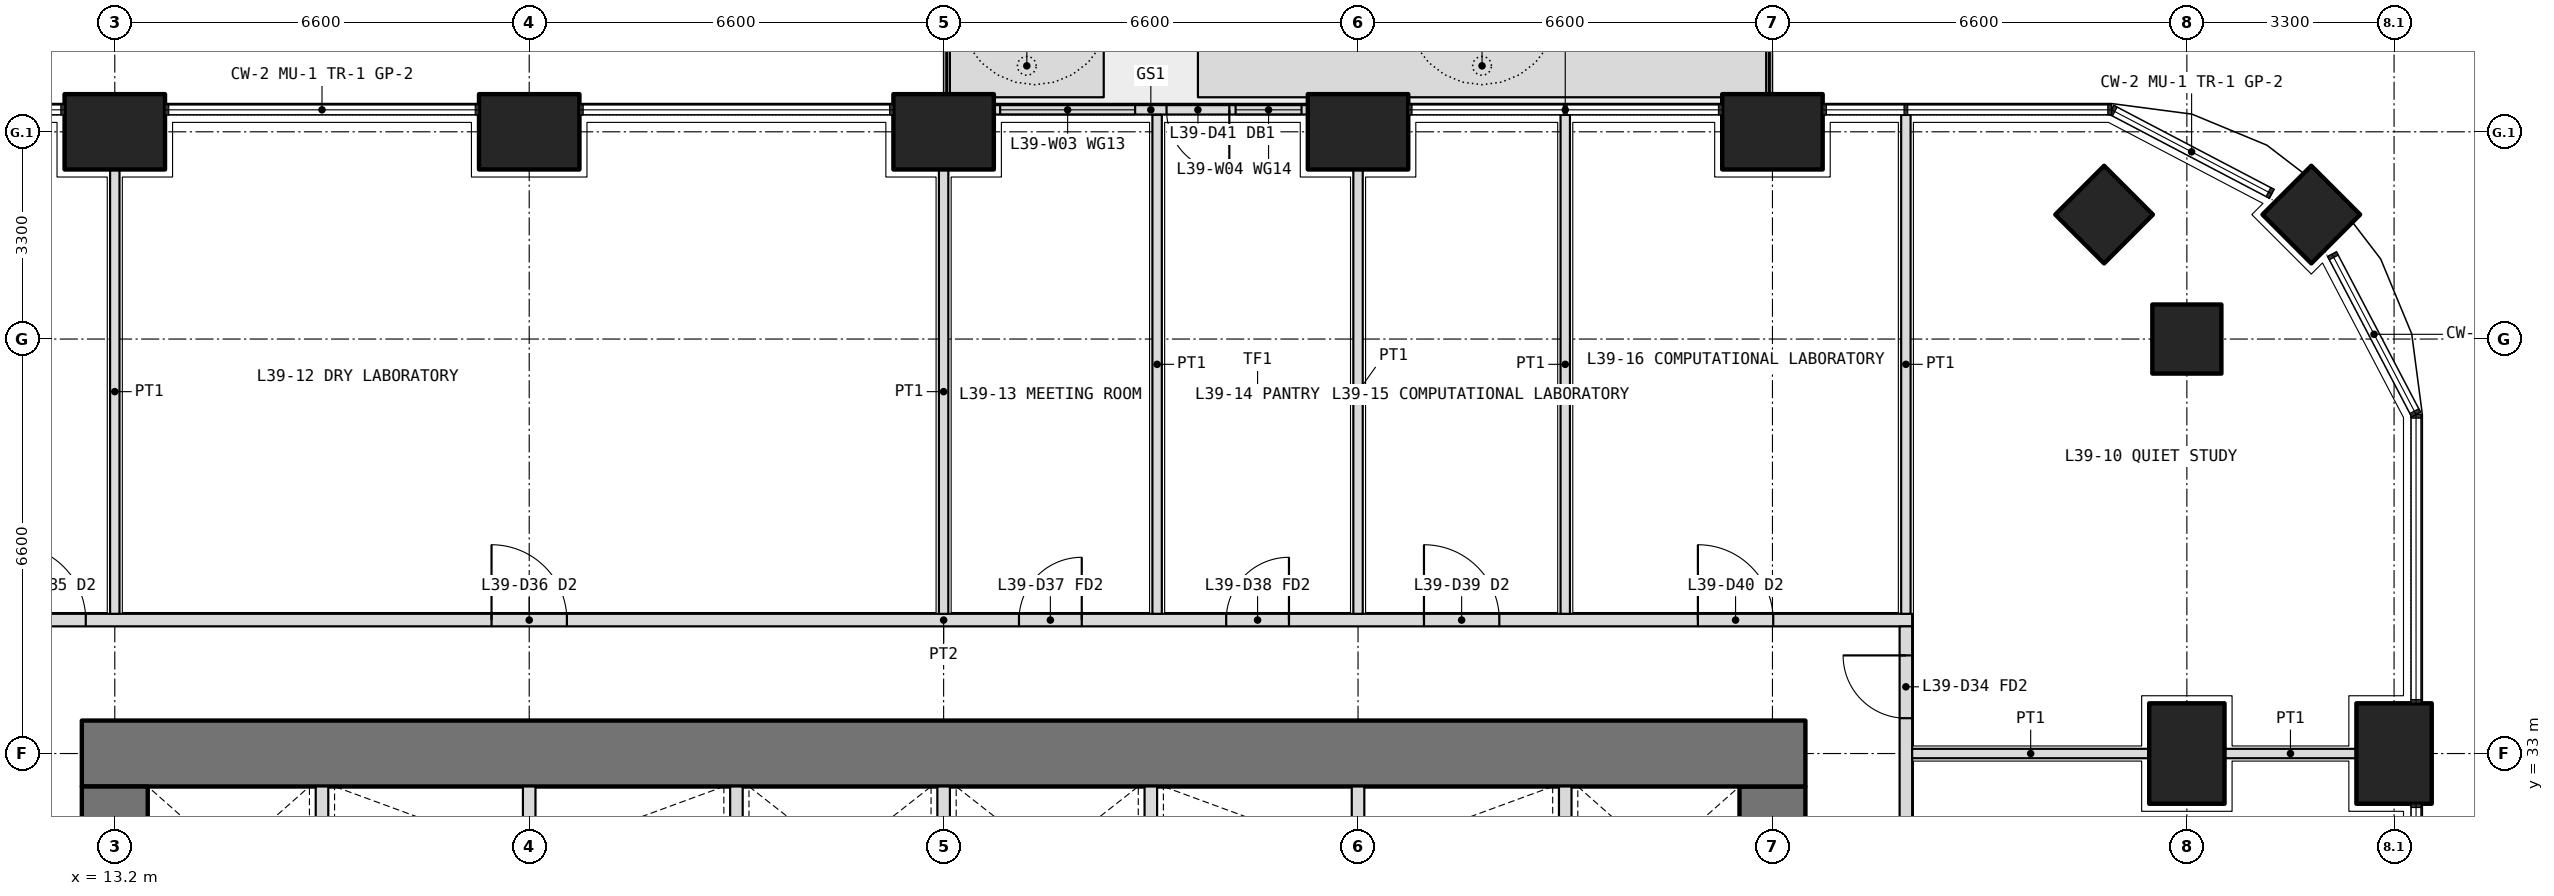
"""IFC4 building model, lengths in metres.
Left out: names, types, materials, properties, quantities, classifications, styles, units other than length and angle.
Written with IfcOpenShell. Run it as: python <this file> out.ifc"""

import sys

from ifc_helpers import new_model, si_unit, direction, frame, frame_2d, origin, origin_2d, place, context, subcontext, project, spatial, polyline, rectangle, outline, extrude, element, fill, save


model = new_model("IFC4")
c1 = context("Model", 3, precision=1e-05, world=origin(), true_north=direction((0.0, 1.0)))
c2 = subcontext(c1, "Body", "Model", "MODEL_VIEW")
j1 = project(units=[si_unit("LENGTHUNIT", "METRE"), si_unit("PLANEANGLEUNIT", "RADIAN")], contexts=[c1])
p1 = place(None, origin())
s1 = spatial("IfcSite", under=j1, at=p1, CompositionType="ELEMENT")
p2 = place(p1, origin())
s2 = spatial("IfcBuilding", under=s1, at=p2, CompositionType="ELEMENT")
p3 = place(p2, frame((0.0, 0.0, 172.5)))
s3 = spatial("IfcBuildingStorey", under=s2, at=p3, CompositionType="ELEMENT", Elevation=172.5)
p4 = place(p3, frame((48.182, 41.582, 0.0), z_axis=(0.0, 0.0, 1.0), x_axis=(0.707106781187, 0.707106781187, 0.0)))
e1 = element("IfcColumn", 1, at=p4, inside=s3, PredefinedType="COLUMN", context=c2, shape_type="SweptSolid", body=[
    extrude(rectangle(XDim=1.1, YDim=1.1, at=origin_2d()), origin(), (0.0, 0.0, 1.0), 4.2),
])
for number, where, z_axis, x_axis in (
    (2, (49.5, 33.0, 0.0), (0.0, 0.0, 1.0), (0.0, 1.0, 0.0)),
    (3, (13.2, 42.9, 0.0), (0.0, 0.0, 1.0), (1.0, 0.0, 0.0)),
    (4, (19.8, 42.9, 0.0), (0.0, 0.0, 1.0), (1.0, 0.0, 0.0)),
    (5, (26.4, 42.9, 0.0), (0.0, 0.0, 1.0), (1.0, 0.0, 0.0)),
    (6, (33.0, 42.9, 0.0), (0.0, 0.0, 1.0), (1.0, 0.0, 0.0)),
    (7, (39.6, 42.9, 0.0), (0.0, 0.0, 1.0), (1.0, 0.0, 0.0)),
):
    element("IfcColumn", number, at=place(p3, frame(where, z_axis=z_axis, x_axis=x_axis)), inside=s3, PredefinedType="COLUMN", context=c2, shape_type="SweptSolid", body=[
        extrude(rectangle(XDim=1.6, YDim=1.2, at=origin_2d()), origin(), (0.0, 0.0, 1.0), 4.2),
    ])
for number, where, z_axis, x_axis in (
    (8, (46.2, 39.6, 0.0), (0.0, 0.0, 1.0), (1.0, 0.0, 0.0)),
    (9, (44.882, 41.582, 0.0), (0.0, 0.0, 1.0), (0.707, 0.707, 0.0)),
):
    element("IfcColumn", number, at=place(p3, frame(where, z_axis=z_axis, x_axis=x_axis)), inside=s3, PredefinedType="COLUMN", context=c2, shape_type="SweptSolid", body=[
        extrude(rectangle(XDim=1.1, YDim=1.1, at=origin_2d()), origin(), (0.0, 0.0, 1.0), 4.2),
    ])
p5 = place(p3, frame((46.2, 33.0, 0.0), z_axis=(0.0, 0.0, 1.0), x_axis=(0.0, 1.0, 0.0)))
e10 = element("IfcColumn", 10, at=p5, inside=s3, PredefinedType="COLUMN", context=c2, shape_type="SweptSolid", body=[
    extrude(rectangle(XDim=1.6, YDim=1.2, at=origin_2d()), origin(), (0.0, 0.0, 1.0), 4.2),
])
p6 = place(p3, origin())
e11 = element("IfcWall", 11, at=p6, inside=s3, PredefinedType="USERDEFINED", context=c2, shape_type="SweptSolid", body=[
    extrude(outline(polyline([(26.5, 43.45), (28.95, 43.45), (28.95, 44.45), (26.5, 44.45), (26.5, 43.45)]), holes=[polyline([(26.65, 43.6), (28.8, 43.6), (28.8, 44.3), (26.65, 44.3), (26.65, 43.6)])]), origin(), (0.0, 0.0, 1.0), 1.05),
])
p7 = place(p3, origin())
e12 = element("IfcWall", 12, at=p7, inside=s3, PredefinedType="USERDEFINED", context=c2, shape_type="SweptSolid", body=[
    extrude(outline(polyline([(30.45, 43.45), (39.5, 43.45), (39.5, 44.45), (30.45, 44.45), (30.45, 43.45)]), holes=[polyline([(30.6, 43.6), (39.35, 43.6), (39.35, 44.3), (30.6, 44.3), (30.6, 43.6)])]), origin(), (0.0, 0.0, 1.0), 1.05),
])
p8 = place(p3, frame((32.2, 43.25, 0.0), z_axis=(0.0, 0.0, 1.0), x_axis=(-1.0, 0.0, 0.0)))
e13 = element("IfcWall", 13, at=p8, inside=s3, PredefinedType="SOLIDWALL", context=c2, shape_type="SweptSolid", body=[
    extrude(rectangle(XDim=5.0, YDim=0.15, at=frame_2d((2.5, 0.0))), origin(), (0.0, 0.0, 1.0), 2.7),
])
p9 = place(p8, frame((1.25, 0.0, 0.0)))
e14 = element("IfcOpeningElement", 14, at=p9, cuts=e13, PredefinedType="OPENING", context=c2, shape_type="SweptSolid", body=[
    extrude(rectangle(XDim=1.0, YDim=2.4, at=frame_2d((0.5, 1.2))), frame((0.0, 0.085, 0.0), z_axis=(0.0, -1.0, 0.0), x_axis=(1.0, 0.0, 0.0)), (0.0, 0.0, 1.0), 0.17),
])
p10 = place(p8, frame((0.1, 0.0, 0.1)))
e15 = element("IfcOpeningElement", 15, at=p10, cuts=e13, PredefinedType="OPENING", context=c2, shape_type="SweptSolid", body=[
    extrude(rectangle(XDim=1.05, YDim=2.3, at=frame_2d((0.525, 1.15))), frame((0.0, 0.085, 0.0), z_axis=(0.0, -1.0, 0.0), x_axis=(1.0, 0.0, 0.0)), (0.0, 0.0, 1.0), 0.17),
])
p11 = place(p8, frame((2.75, 0.0, 0.1)))
e16 = element("IfcOpeningElement", 16, at=p11, cuts=e13, PredefinedType="OPENING", context=c2, shape_type="SweptSolid", body=[
    extrude(rectangle(XDim=2.15, YDim=2.3, at=frame_2d((1.075, 1.15))), frame((0.0, 0.085, 0.0), z_axis=(0.0, -1.0, 0.0), x_axis=(1.0, 0.0, 0.0)), (0.0, 0.0, 1.0), 0.17),
])
p12 = place(p3, frame((39.6, 13.725, 0.0), z_axis=(0.0, 0.0, 1.0), x_axis=(0.0, 1.0, 0.0)))
e17 = element("IfcWall", 17, at=p12, inside=s3, PredefinedType="SHEAR", context=c2, shape_type="SweptSolid", body=[
    extrude(rectangle(XDim=18.75, YDim=1.05, at=frame_2d((9.375, 0.0))), origin(), (0.0, 0.0, 1.0), 4.2),
])
p13 = place(p12, frame((3.025, 0.0, 0.0)))
e18 = element("IfcOpeningElement", 18, at=p13, cuts=e17, PredefinedType="OPENING", context=c2, shape_type="SweptSolid", body=[
    extrude(rectangle(XDim=1.6, YDim=2.1, at=frame_2d((0.8, 1.05))), frame((0.0, 0.535, 0.0), z_axis=(0.0, -1.0, 0.0), x_axis=(1.0, 0.0, 0.0)), (0.0, 0.0, 1.0), 1.07),
])
p14 = place(p12, frame((13.825, 0.0, 0.0)))
e19 = element("IfcOpeningElement", 19, at=p14, cuts=e17, PredefinedType="OPENING", context=c2, shape_type="SweptSolid", body=[
    extrude(rectangle(XDim=1.6, YDim=2.1, at=frame_2d((0.8, 1.05))), frame((0.0, 0.535, 0.0), z_axis=(0.0, -1.0, 0.0), x_axis=(1.0, 0.0, 0.0)), (0.0, 0.0, 1.0), 1.07),
])
p15 = place(p3, frame((40.125, 33.0, 0.0), z_axis=(0.0, 0.0, 1.0), x_axis=(-1.0, 0.0, 0.0)))
e20 = element("IfcWall", 20, at=p15, inside=s3, PredefinedType="SHEAR", context=c2, shape_type="SweptSolid", body=[
    extrude(rectangle(XDim=27.45, YDim=1.05, at=frame_2d((13.725, 0.0))), origin(), (0.0, 0.0, 1.0), 4.2),
])
p16 = place(p3, frame((13.2, 32.475, 0.0), z_axis=(0.0, 0.0, 1.0), x_axis=(0.0, -1.0, 0.0)))
e21 = element("IfcWall", 21, at=p16, inside=s3, PredefinedType="SHEAR", context=c2, shape_type="SweptSolid", body=[
    extrude(rectangle(XDim=18.75, YDim=1.05, at=frame_2d((9.375, 0.0))), origin(), (0.0, 0.0, 1.0), 4.2),
])
p17 = place(p16, frame((14.125, 0.0, 0.0)))
e22 = element("IfcOpeningElement", 22, at=p17, cuts=e21, PredefinedType="OPENING", context=c2, shape_type="SweptSolid", body=[
    extrude(rectangle(XDim=1.6, YDim=2.1, at=frame_2d((0.8, 1.05))), frame((0.0, 0.535, 0.0), z_axis=(0.0, -1.0, 0.0), x_axis=(1.0, 0.0, 0.0)), (0.0, 0.0, 1.0), 1.07),
])
p18 = place(p16, frame((3.325, 0.0, 0.0)))
e23 = element("IfcOpeningElement", 23, at=p18, cuts=e21, PredefinedType="OPENING", context=c2, shape_type="SweptSolid", body=[
    extrude(rectangle(XDim=1.6, YDim=2.1, at=frame_2d((0.8, 1.05))), frame((0.0, 0.535, 0.0), z_axis=(0.0, -1.0, 0.0), x_axis=(1.0, 0.0, 0.0)), (0.0, 0.0, 1.0), 1.07),
])
for number, where, z_axis, x_axis in (
    (24, (16.5, 30.2, 0.0), (0.0, 0.0, 1.0), (0.0, 1.0, 0.0)),
    (25, (19.8, 30.2, 0.0), (0.0, 0.0, 1.0), (0.0, 1.0, 0.0)),
    (26, (23.1, 30.2, 0.0), (0.0, 0.0, 1.0), (0.0, 1.0, 0.0)),
    (27, (26.4, 30.2, 0.0), (0.0, 0.0, 1.0), (0.0, 1.0, 0.0)),
    (28, (29.7, 30.2, 0.0), (0.0, 0.0, 1.0), (0.0, 1.0, 0.0)),
    (29, (33.0, 30.2, 0.0), (0.0, 0.0, 1.0), (0.0, 1.0, 0.0)),
    (30, (36.3, 30.2, 0.0), (0.0, 0.0, 1.0), (0.0, 1.0, 0.0)),
):
    element("IfcWall", number, at=place(p3, frame(where, z_axis=z_axis, x_axis=x_axis)), inside=s3, PredefinedType="PARTITIONING", context=c2, shape_type="SweptSolid", body=[
        extrude(rectangle(XDim=2.275, YDim=0.2, at=frame_2d((1.138, 0.0))), origin(), (0.0, 0.0, 1.0), 4.2),
    ])
p19 = place(p3, frame((10.975, 35.125, 0.0), z_axis=(0.0, 0.0, 1.0), x_axis=(1.0, 0.0, 0.0)))
e31 = element("IfcWall", 31, at=p19, inside=s3, PredefinedType="PARTITIONING", context=c2, shape_type="SweptSolid", body=[
    extrude(rectangle(XDim=30.85, YDim=0.2, at=frame_2d((15.425, 0.0))), origin(), (0.0, 0.0, 1.0), 2.85),
])
p20 = place(p19, frame((0.562, 0.0, 0.0)))
e32 = element("IfcOpeningElement", 32, at=p20, cuts=e31, PredefinedType="OPENING", context=c2, shape_type="SweptSolid", body=[
    extrude(rectangle(XDim=1.2, YDim=2.1, at=frame_2d((0.6, 1.05))), frame((0.0, 0.11, 0.0), z_axis=(0.0, -1.0, 0.0), x_axis=(1.0, 0.0, 0.0)), (0.0, 0.0, 1.0), 0.22),
])
p21 = place(p19, frame((8.225, 0.0, 0.0)))
e33 = element("IfcOpeningElement", 33, at=p21, cuts=e31, PredefinedType="OPENING", context=c2, shape_type="SweptSolid", body=[
    extrude(rectangle(XDim=1.2, YDim=2.1, at=frame_2d((0.6, 1.05))), frame((0.0, 0.11, 0.0), z_axis=(0.0, -1.0, 0.0), x_axis=(1.0, 0.0, 0.0)), (0.0, 0.0, 1.0), 0.22),
])
p22 = place(p19, frame((16.625, 0.0, 0.0)))
e34 = element("IfcOpeningElement", 34, at=p22, cuts=e31, PredefinedType="OPENING", context=c2, shape_type="SweptSolid", body=[
    extrude(rectangle(XDim=1.0, YDim=2.1, at=frame_2d((0.5, 1.05))), frame((0.0, 0.11, 0.0), z_axis=(0.0, -1.0, 0.0), x_axis=(1.0, 0.0, 0.0)), (0.0, 0.0, 1.0), 0.22),
])
p23 = place(p19, frame((19.925, 0.0, 0.0)))
e35 = element("IfcOpeningElement", 35, at=p23, cuts=e31, PredefinedType="OPENING", context=c2, shape_type="SweptSolid", body=[
    extrude(rectangle(XDim=1.0, YDim=2.1, at=frame_2d((0.5, 1.05))), frame((0.0, 0.11, 0.0), z_axis=(0.0, -1.0, 0.0), x_axis=(1.0, 0.0, 0.0)), (0.0, 0.0, 1.0), 0.22),
])
p24 = place(p19, frame((23.075, 0.0, 0.0)))
e36 = element("IfcOpeningElement", 36, at=p24, cuts=e31, PredefinedType="OPENING", context=c2, shape_type="SweptSolid", body=[
    extrude(rectangle(XDim=1.2, YDim=2.1, at=frame_2d((0.6, 1.05))), frame((0.0, 0.11, 0.0), z_axis=(0.0, -1.0, 0.0), x_axis=(1.0, 0.0, 0.0)), (0.0, 0.0, 1.0), 0.22),
])
p25 = place(p19, frame((27.438, 0.0, 0.0)))
e37 = element("IfcOpeningElement", 37, at=p25, cuts=e31, PredefinedType="OPENING", context=c2, shape_type="SweptSolid", body=[
    extrude(rectangle(XDim=1.2, YDim=2.1, at=frame_2d((0.6, 1.05))), frame((0.0, 0.11, 0.0), z_axis=(0.0, -1.0, 0.0), x_axis=(1.0, 0.0, 0.0)), (0.0, 0.0, 1.0), 0.22),
])
p26 = place(p3, frame((41.725, 11.175, 0.0), z_axis=(0.0, 0.0, 1.0), x_axis=(0.0, 1.0, 0.0)))
e38 = element("IfcWall", 38, at=p26, inside=s3, PredefinedType="PARTITIONING", context=c2, shape_type="SweptSolid", body=[
    extrude(rectangle(XDim=23.85, YDim=0.2, at=frame_2d((11.925, 0.0))), origin(), (0.0, 0.0, 1.0), 2.85),
])
p27 = place(p26, frame((3.762, 0.0, 0.0)))
e39 = element("IfcOpeningElement", 39, at=p27, cuts=e38, PredefinedType="OPENING", context=c2, shape_type="SweptSolid", body=[
    extrude(rectangle(XDim=1.0, YDim=2.1, at=frame_2d((0.5, 1.05))), frame((0.0, 0.11, 0.0), z_axis=(0.0, -1.0, 0.0), x_axis=(1.0, 0.0, 0.0)), (0.0, 0.0, 1.0), 0.22),
])
p28 = place(p26, frame((9.625, 0.0, 0.0)))
e40 = element("IfcOpeningElement", 40, at=p28, cuts=e38, PredefinedType="OPENING", context=c2, shape_type="SweptSolid", body=[
    extrude(rectangle(XDim=1.0, YDim=2.1, at=frame_2d((0.5, 1.05))), frame((0.0, 0.11, 0.0), z_axis=(0.0, -1.0, 0.0), x_axis=(1.0, 0.0, 0.0)), (0.0, 0.0, 1.0), 0.22),
])
p29 = place(p26, frame((12.975, 0.0, 0.0)))
e41 = element("IfcOpeningElement", 41, at=p29, cuts=e38, PredefinedType="OPENING", context=c2, shape_type="SweptSolid", body=[
    extrude(rectangle(XDim=0.9, YDim=2.1, at=frame_2d((0.45, 1.05))), frame((0.0, 0.11, 0.0), z_axis=(0.0, -1.0, 0.0), x_axis=(1.0, 0.0, 0.0)), (0.0, 0.0, 1.0), 0.22),
])
p30 = place(p26, frame((17.925, 0.0, 0.0)))
e42 = element("IfcOpeningElement", 42, at=p30, cuts=e38, PredefinedType="OPENING", context=c2, shape_type="SweptSolid", body=[
    extrude(rectangle(XDim=1.2, YDim=2.1, at=frame_2d((0.6, 1.05))), frame((0.0, 0.11, 0.0), z_axis=(0.0, -1.0, 0.0), x_axis=(1.0, 0.0, 0.0)), (0.0, 0.0, 1.0), 0.22),
])
p31 = place(p26, frame((22.387, 0.0, 0.0)))
e43 = element("IfcOpeningElement", 43, at=p31, cuts=e38, PredefinedType="OPENING", context=c2, shape_type="SweptSolid", body=[
    extrude(rectangle(XDim=1.0, YDim=2.1, at=frame_2d((0.5, 1.05))), frame((0.0, 0.11, 0.0), z_axis=(0.0, -1.0, 0.0), x_axis=(1.0, 0.0, 0.0)), (0.0, 0.0, 1.0), 0.22),
])
p32 = place(p3, frame((41.725, 43.17, 0.0), z_axis=(0.0, 0.0, 1.0), x_axis=(0.0, -1.0, 0.0)))
e44 = element("IfcWall", 44, at=p32, inside=s3, PredefinedType="PARTITIONING", context=c2, shape_type="SweptSolid", body=[
    extrude(rectangle(XDim=7.945, YDim=0.15, at=frame_2d((3.972, 0.0))), origin(), (0.0, 0.0, 1.0), 2.7),
])
p33 = place(p3, frame((48.9, 33.0, 0.0), z_axis=(0.0, 0.0, 1.0), x_axis=(-1.0, 0.0, 0.0)))
e45 = element("IfcWall", 45, at=p33, inside=s3, PredefinedType="PARTITIONING", context=c2, shape_type="SweptSolid", body=[
    extrude(rectangle(XDim=2.1, YDim=0.15, at=frame_2d((1.05, 0.0))), origin(), (0.0, 0.0, 1.0), 2.85),
])
p34 = place(p3, frame((45.6, 33.0, 0.0), z_axis=(0.0, 0.0, 1.0), x_axis=(-1.0, 0.0, 0.0)))
e46 = element("IfcWall", 46, at=p34, inside=s3, PredefinedType="PARTITIONING", context=c2, shape_type="SweptSolid", body=[
    extrude(rectangle(XDim=3.775, YDim=0.15, at=frame_2d((1.888, 0.0))), origin(), (0.0, 0.0, 1.0), 2.85),
])
p35 = place(p3, frame((29.8, 43.17, 0.0), z_axis=(0.0, 0.0, 1.0), x_axis=(0.0, -1.0, 0.0)))
e47 = element("IfcWall", 47, at=p35, inside=s3, PredefinedType="PARTITIONING", context=c2, shape_type="SweptSolid", body=[
    extrude(rectangle(XDim=7.945, YDim=0.15, at=frame_2d((3.972, 0.0))), origin(), (0.0, 0.0, 1.0), 2.7),
])
for number, where, z_axis, x_axis in (
    (48, (33.0, 42.3, 0.0), (0.0, 0.0, 1.0), (0.0, -1.0, 0.0)),
    (49, (13.2, 42.3, 0.0), (0.0, 0.0, 1.0), (0.0, -1.0, 0.0)),
    (50, (26.4, 42.3, 0.0), (0.0, 0.0, 1.0), (0.0, -1.0, 0.0)),
):
    element("IfcWall", number, at=place(p3, frame(where, z_axis=z_axis, x_axis=x_axis)), inside=s3, PredefinedType="PARTITIONING", context=c2, shape_type="SweptSolid", body=[
        extrude(rectangle(XDim=7.075, YDim=0.15, at=frame_2d((3.538, 0.0))), origin(), (0.0, 0.0, 1.0), 2.85),
    ])
p36 = place(p3, frame((36.3, 43.17, 0.0), z_axis=(0.0, 0.0, 1.0), x_axis=(0.0, -1.0, 0.0)))
e51 = element("IfcWall", 51, at=p36, inside=s3, PredefinedType="PARTITIONING", context=c2, shape_type="SweptSolid", body=[
    extrude(rectangle(XDim=7.945, YDim=0.15, at=frame_2d((3.972, 0.0))), origin(), (0.0, 0.0, 1.0), 2.7),
])
p37 = place(p9, origin())
e52 = element("IfcDoor", 52, at=p37, inside=s3, OperationType="SINGLE_SWING_LEFT", PredefinedType="DOOR", context=c2, shape_type="SweptSolid", body=[
    extrude(rectangle(XDim=1.0, YDim=2.4, at=frame_2d((0.5, 1.2))), frame((0.0, 0.025, 0.0), z_axis=(0.0, -1.0, 0.0), x_axis=(1.0, 0.0, 0.0)), (0.0, 0.0, 1.0), 0.05),
])
fill(e14, e52)
p38 = place(p10, origin())
e53 = element("IfcWindow", 53, at=p38, inside=s3, PartitioningType="SINGLE_PANEL", PredefinedType="WINDOW", context=c2, shape_type="SweptSolid", body=[
    extrude(rectangle(XDim=1.05, YDim=2.3, at=frame_2d((0.525, 1.15))), frame((0.0, 0.03, 0.0), z_axis=(0.0, -1.0, 0.0), x_axis=(1.0, 0.0, 0.0)), (0.0, 0.0, 1.0), 0.06),
])
fill(e15, e53)
p39 = place(p11, origin())
e54 = element("IfcWindow", 54, at=p39, inside=s3, PartitioningType="SINGLE_PANEL", PredefinedType="WINDOW", context=c2, shape_type="SweptSolid", body=[
    extrude(rectangle(XDim=2.15, YDim=2.3, at=frame_2d((1.075, 1.15))), frame((0.0, 0.03, 0.0), z_axis=(0.0, -1.0, 0.0), x_axis=(1.0, 0.0, 0.0)), (0.0, 0.0, 1.0), 0.06),
])
fill(e16, e54)
p40 = place(p31, origin())
e55 = element("IfcDoor", 55, at=p40, inside=s3, OperationType="SINGLE_SWING_RIGHT", PredefinedType="DOOR", context=c2, shape_type="SweptSolid", body=[
    extrude(rectangle(XDim=1.0, YDim=2.1, at=frame_2d((0.5, 1.05))), frame((0.0, 0.025, 0.0), z_axis=(0.0, -1.0, 0.0), x_axis=(1.0, 0.0, 0.0)), (0.0, 0.0, 1.0), 0.05),
])
fill(e43, e55)
p41 = place(p20, origin())
e56 = element("IfcDoor", 56, at=p41, inside=s3, OperationType="DOUBLE_DOOR_SINGLE_SWING", PredefinedType="DOOR", context=c2, shape_type="SweptSolid", body=[
    extrude(rectangle(XDim=1.2, YDim=2.1, at=frame_2d((0.6, 1.05))), frame((0.0, 0.025, 0.0), z_axis=(0.0, -1.0, 0.0), x_axis=(1.0, 0.0, 0.0)), (0.0, 0.0, 1.0), 0.05),
])
fill(e32, e56)
p42 = place(p21, origin())
e57 = element("IfcDoor", 57, at=p42, inside=s3, OperationType="DOUBLE_DOOR_SINGLE_SWING", PredefinedType="DOOR", context=c2, shape_type="SweptSolid", body=[
    extrude(rectangle(XDim=1.2, YDim=2.1, at=frame_2d((0.6, 1.05))), frame((0.0, 0.025, 0.0), z_axis=(0.0, -1.0, 0.0), x_axis=(1.0, 0.0, 0.0)), (0.0, 0.0, 1.0), 0.05),
])
fill(e33, e57)
p43 = place(p22, origin())
e58 = element("IfcDoor", 58, at=p43, inside=s3, OperationType="SINGLE_SWING_RIGHT", PredefinedType="DOOR", context=c2, shape_type="SweptSolid", body=[
    extrude(rectangle(XDim=1.0, YDim=2.1, at=frame_2d((0.5, 1.05))), frame((0.0, 0.025, 0.0), z_axis=(0.0, -1.0, 0.0), x_axis=(1.0, 0.0, 0.0)), (0.0, 0.0, 1.0), 0.05),
])
fill(e34, e58)
p44 = place(p23, origin())
e59 = element("IfcDoor", 59, at=p44, inside=s3, OperationType="SINGLE_SWING_RIGHT", PredefinedType="DOOR", context=c2, shape_type="SweptSolid", body=[
    extrude(rectangle(XDim=1.0, YDim=2.1, at=frame_2d((0.5, 1.05))), frame((0.0, 0.025, 0.0), z_axis=(0.0, -1.0, 0.0), x_axis=(1.0, 0.0, 0.0)), (0.0, 0.0, 1.0), 0.05),
])
fill(e35, e59)
p45 = place(p24, origin())
e60 = element("IfcDoor", 60, at=p45, inside=s3, OperationType="DOUBLE_DOOR_SINGLE_SWING", PredefinedType="DOOR", context=c2, shape_type="SweptSolid", body=[
    extrude(rectangle(XDim=1.2, YDim=2.1, at=frame_2d((0.6, 1.05))), frame((0.0, 0.025, 0.0), z_axis=(0.0, -1.0, 0.0), x_axis=(1.0, 0.0, 0.0)), (0.0, 0.0, 1.0), 0.05),
])
fill(e36, e60)
p46 = place(p25, origin())
e61 = element("IfcDoor", 61, at=p46, inside=s3, OperationType="DOUBLE_DOOR_SINGLE_SWING", PredefinedType="DOOR", context=c2, shape_type="SweptSolid", body=[
    extrude(rectangle(XDim=1.2, YDim=2.1, at=frame_2d((0.6, 1.05))), frame((0.0, 0.025, 0.0), z_axis=(0.0, -1.0, 0.0), x_axis=(1.0, 0.0, 0.0)), (0.0, 0.0, 1.0), 0.05),
])
fill(e37, e61)
save(model, sys.argv[1])
